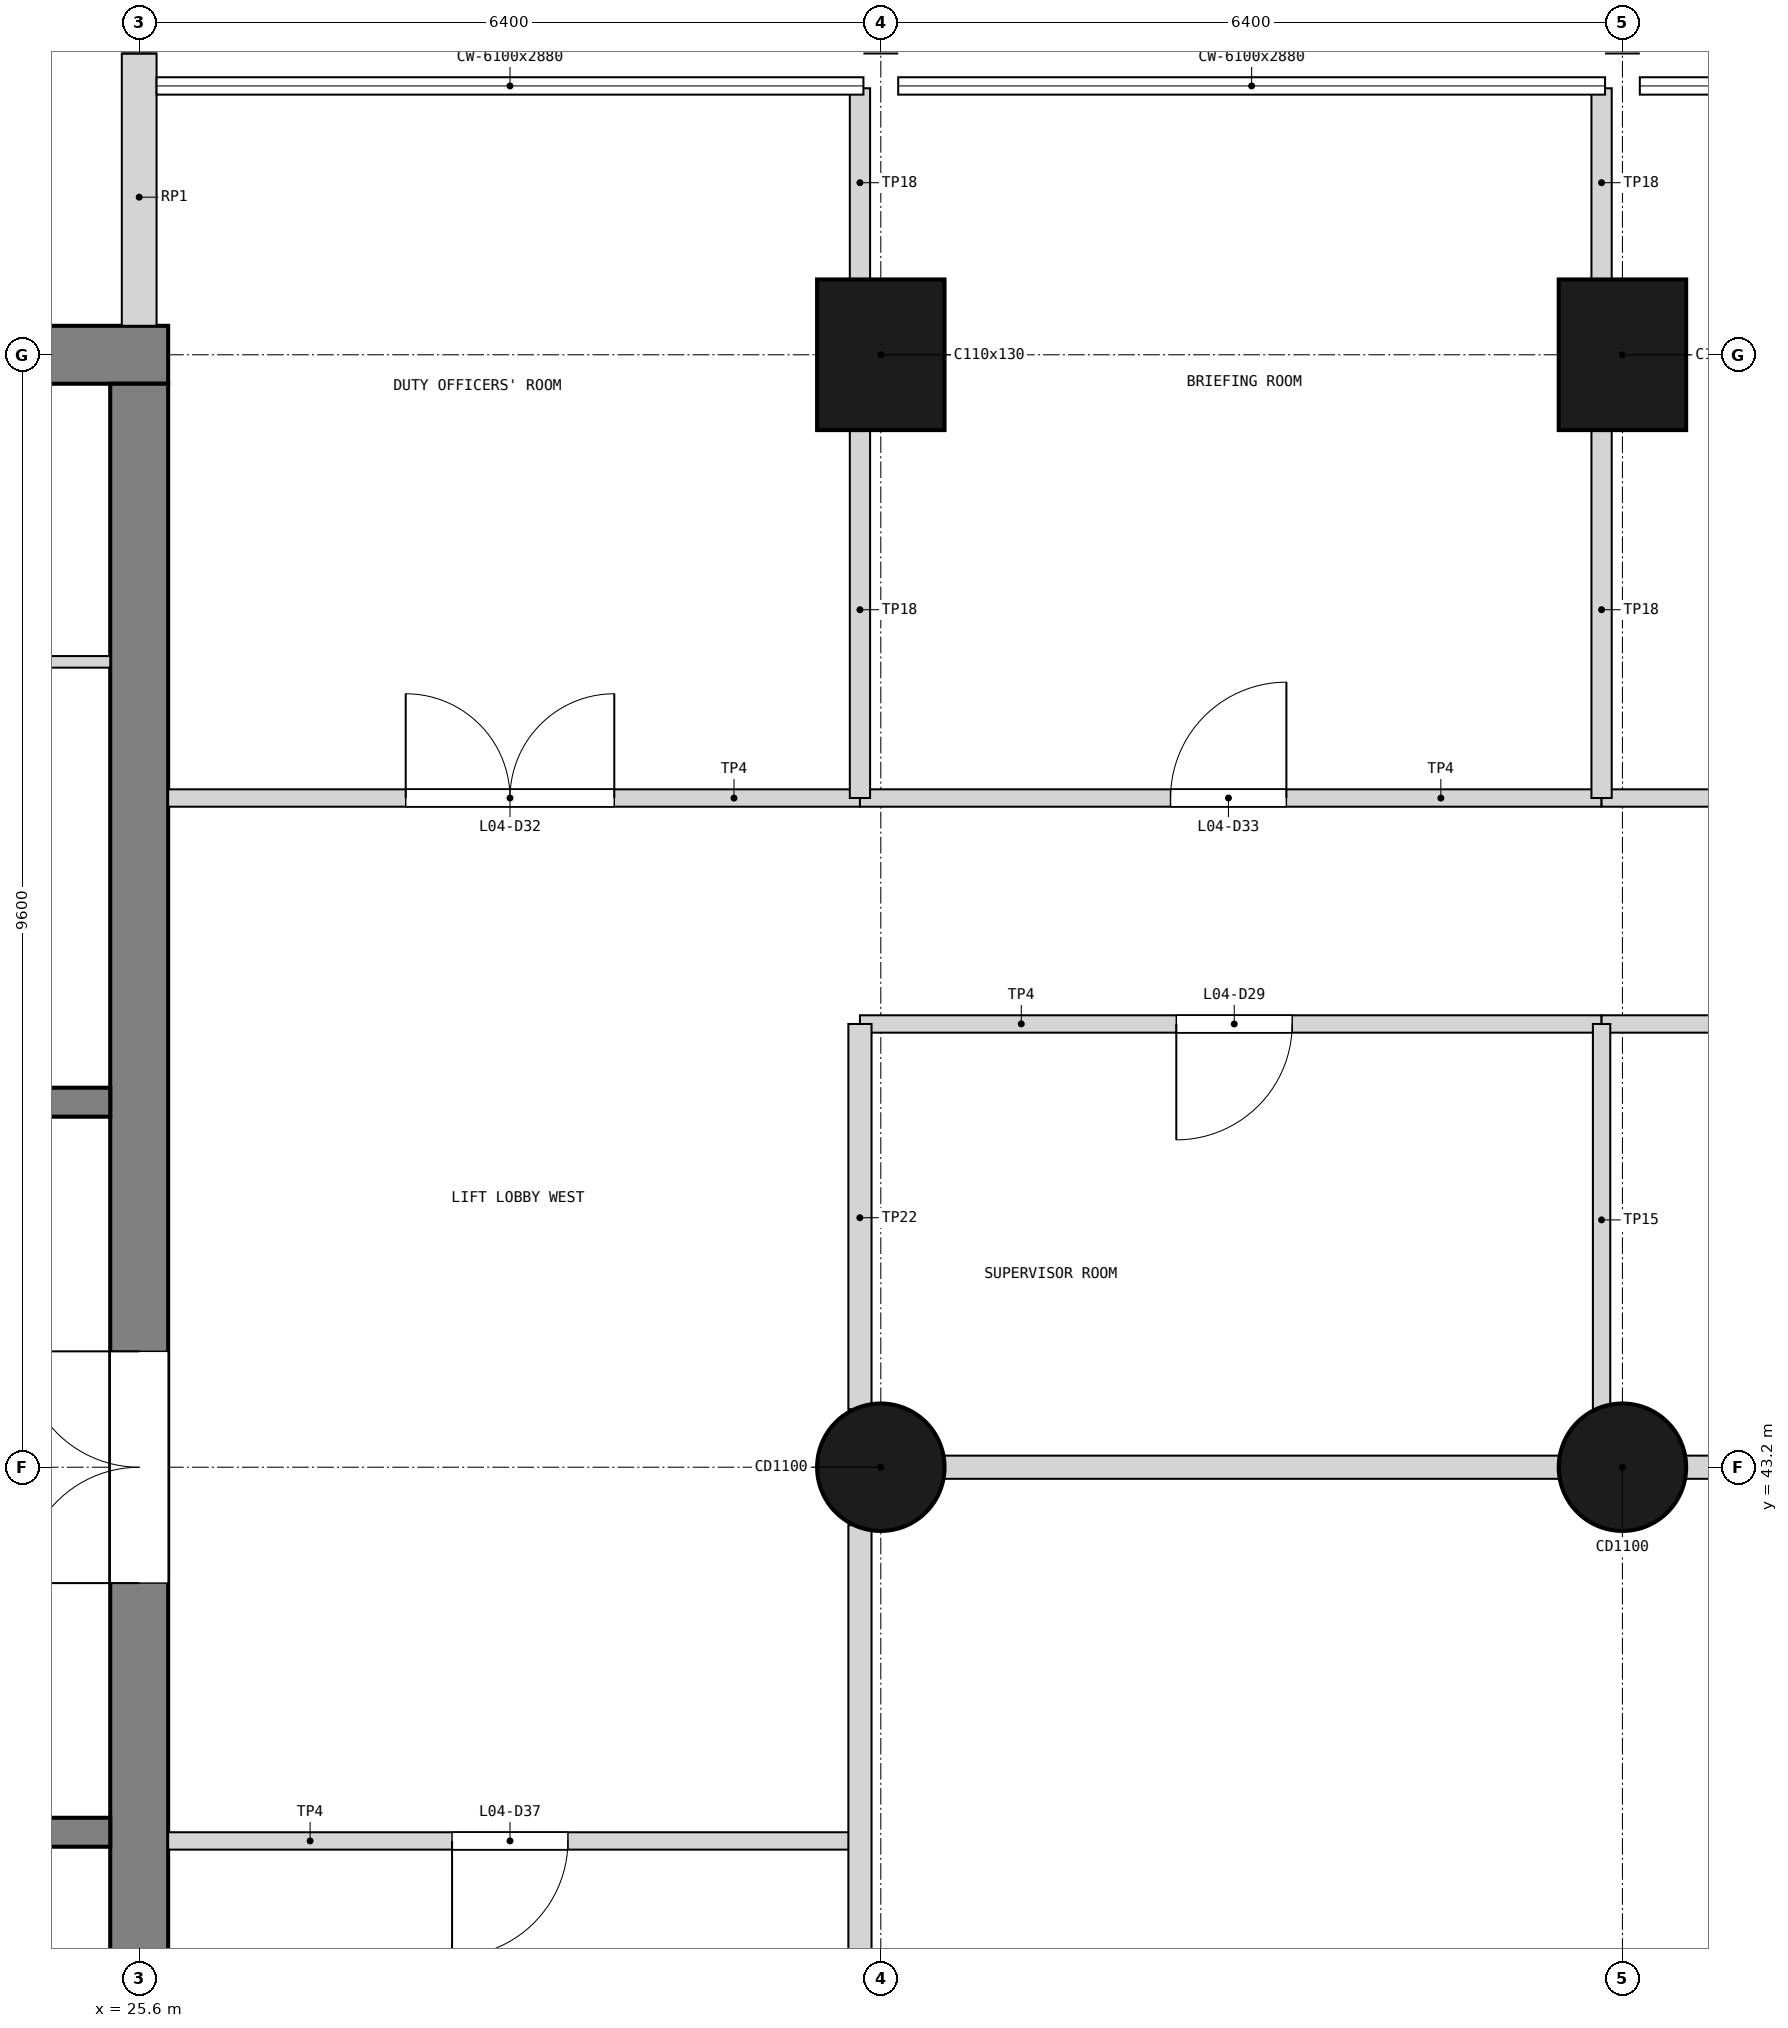
"""IFC4 building model, lengths in metres.
Left out: names, types, materials, properties, quantities, classifications, styles, units other than length and angle.
Written with IfcOpenShell. Run it as: python <this file> out.ifc"""

import sys

from ifc_helpers import new_model, si_unit, direction, frame, frame_2d, origin, origin_2d, place, context, subcontext, project, spatial, rectangle, circle, extrude, element, fill, save


model = new_model("IFC4")
c1 = context("Model", 3, precision=1e-05, world=origin(), true_north=direction((0.0, 1.0)))
c2 = subcontext(c1, "Body", "Model", "MODEL_VIEW")
j1 = project(units=[si_unit("LENGTHUNIT", "METRE"), si_unit("PLANEANGLEUNIT", "RADIAN")], contexts=[c1])
p1 = place(None, origin())
s1 = spatial("IfcSite", under=j1, at=p1, CompositionType="ELEMENT")
p2 = place(p1, origin())
s2 = spatial("IfcBuilding", under=s1, at=p2, CompositionType="ELEMENT")
p3 = place(p2, frame((0.0, 0.0, 17.1)))
s3 = spatial("IfcBuildingStorey", under=s2, at=p3, CompositionType="ELEMENT", Elevation=17.1)
p4 = place(p3, frame((12.55, 52.8, 0.0), z_axis=(0.0, 0.0, 1.0), x_axis=(1.0, 0.0, 0.0)))
e1 = element("IfcWall", 1, at=p4, inside=s3, PredefinedType="SHEAR", context=c2, shape_type="SweptSolid", body=[
    extrude(rectangle(XDim=13.3, YDim=0.5, at=frame_2d((6.65, 0.0))), origin(), (0.0, 0.0, 1.0), 3.9),
])
p5 = place(p4, frame((1.85, 0.0, 1.0)))
e2 = element("IfcOpeningElement", 2, at=p5, cuts=e1, PredefinedType="OPENING", context=c2, shape_type="SweptSolid", body=[
    extrude(rectangle(XDim=0.4, YDim=2.0, at=frame_2d((0.2, 1.0))), frame((0.0, 0.26, 0.0), z_axis=(0.0, -1.0, 0.0), x_axis=(1.0, 0.0, 0.0)), (0.0, 0.0, 1.0), 0.52),
])
p6 = place(p3, frame((25.6, 33.85, 0.0), z_axis=(0.0, 0.0, 1.0), x_axis=(0.0, 1.0, 0.0)))
e3 = element("IfcWall", 3, at=p6, inside=s3, PredefinedType="SHEAR", context=c2, shape_type="SweptSolid", body=[
    extrude(rectangle(XDim=18.7, YDim=0.5, at=frame_2d((9.35, 0.0))), origin(), (0.0, 0.0, 1.0), 3.9),
])
p7 = place(p6, frame((8.35, 0.0, 0.0)))
e4 = element("IfcOpeningElement", 4, at=p7, cuts=e3, PredefinedType="OPENING", context=c2, shape_type="SweptSolid", body=[
    extrude(rectangle(XDim=2.0, YDim=2.1, at=frame_2d((1.0, 1.05))), frame((0.0, 0.26, 0.0), z_axis=(0.0, -1.0, 0.0), x_axis=(1.0, 0.0, 0.0)), (0.0, 0.0, 1.0), 0.52),
])
p8 = place(p3, frame((32.0, 43.2, 0.0), z_axis=(0.0, 0.0, 1.0), x_axis=(1.0, 0.0, 0.0)))
e5 = element("IfcColumn", 5, at=p8, inside=s3, PredefinedType="COLUMN", context=c2, shape_type="SweptSolid", body=[
    extrude(circle(Radius=0.55, at=origin_2d()), origin(), (0.0, 0.0, 1.0), 3.9),
])
p9 = place(p3, frame((32.0, 52.8, 0.0), z_axis=(0.0, 0.0, 1.0), x_axis=(1.0, 0.0, 0.0)))
e6 = element("IfcColumn", 6, at=p9, inside=s3, PredefinedType="COLUMN", context=c2, shape_type="SweptSolid", body=[
    extrude(rectangle(XDim=1.1, YDim=1.3, at=origin_2d()), origin(), (0.0, 0.0, 1.0), 3.9),
])
p10 = place(p3, frame((38.4, 43.2, 0.0), z_axis=(0.0, 0.0, 1.0), x_axis=(1.0, 0.0, 0.0)))
e7 = element("IfcColumn", 7, at=p10, inside=s3, PredefinedType="COLUMN", context=c2, shape_type="SweptSolid", body=[
    extrude(circle(Radius=0.55, at=origin_2d()), origin(), (0.0, 0.0, 1.0), 3.9),
])
p11 = place(p3, frame((38.4, 52.8, 0.0), z_axis=(0.0, 0.0, 1.0), x_axis=(1.0, 0.0, 0.0)))
e8 = element("IfcColumn", 8, at=p11, inside=s3, PredefinedType="COLUMN", context=c2, shape_type="SweptSolid", body=[
    extrude(rectangle(XDim=1.1, YDim=1.3, at=origin_2d()), origin(), (0.0, 0.0, 1.0), 3.9),
])
p12 = place(p3, frame((25.6, 53.05, 0.0), z_axis=(0.0, 0.0, 1.0), x_axis=(0.0, 1.0, 0.0)))
e9 = element("IfcWall", 9, at=p12, inside=s3, PredefinedType="SOLIDWALL", context=c2, shape_type="SweptSolid", body=[
    extrude(rectangle(XDim=2.35, YDim=0.3, at=frame_2d((1.175, 0.0))), origin(), (0.0, 0.0, 1.0), 2.88),
])
for number, where, z_axis, x_axis in (
    (10, (19.875, 40.05, 0.0), (0.0, 0.0, 1.0), (1.0, 0.0, 0.0)),
    (11, (19.875, 46.35, 0.0), (0.0, 0.0, 1.0), (1.0, 0.0, 0.0)),
):
    element("IfcWall", number, at=place(p3, frame(where, z_axis=z_axis, x_axis=x_axis)), inside=s3, PredefinedType="SOLIDWALL", context=c2, shape_type="SweptSolid", body=[
        extrude(rectangle(XDim=5.475, YDim=0.25, at=frame_2d((2.738, 0.0))), origin(), (0.0, 0.0, 1.0), 3.6),
    ])
p13 = place(p3, frame((20.125, 50.15, 0.0), z_axis=(0.0, 0.0, 1.0), x_axis=(1.0, 0.0, 0.0)))
e12 = element("IfcWall", 12, at=p13, inside=s3, PredefinedType="PARTITIONING", context=c2, shape_type="SweptSolid", body=[
    extrude(rectangle(XDim=5.225, YDim=0.1, at=frame_2d((2.613, 0.0))), origin(), (0.0, 0.0, 1.0), 3.6),
])
p14 = place(p3, frame((31.82, 47.025, 0.0), z_axis=(0.0, 0.0, 1.0), x_axis=(1.0, 0.0, 0.0)))
e13 = element("IfcWall", 13, at=p14, inside=s3, PredefinedType="PARTITIONING", context=c2, shape_type="SweptSolid", body=[
    extrude(rectangle(XDim=6.4, YDim=0.15, at=frame_2d((3.2, 0.0))), origin(), (0.0, 0.0, 1.0), 3.68),
])
p15 = place(p14, frame((2.73, 0.0, 0.0)))
e14 = element("IfcOpeningElement", 14, at=p15, cuts=e13, PredefinedType="OPENING", context=c2, shape_type="SweptSolid", body=[
    extrude(rectangle(XDim=1.0, YDim=2.1, at=frame_2d((0.5, 1.05))), frame((0.0, 0.085, 0.0), z_axis=(0.0, -1.0, 0.0), x_axis=(1.0, 0.0, 0.0)), (0.0, 0.0, 1.0), 0.17),
])
p16 = place(p3, frame((38.22, 47.025, 0.0), z_axis=(0.0, 0.0, 1.0), x_axis=(1.0, 0.0, 0.0)))
e15 = element("IfcWall", 15, at=p16, inside=s3, PredefinedType="PARTITIONING", context=c2, shape_type="SweptSolid", body=[
    extrude(rectangle(XDim=19.56, YDim=0.15, at=frame_2d((9.78, 0.0))), origin(), (0.0, 0.0, 1.0), 3.68),
])
p17 = place(p16, frame((4.03, 0.0, 0.0)))
e16 = element("IfcOpeningElement", 16, at=p17, cuts=e15, PredefinedType="OPENING", context=c2, shape_type="SweptSolid", body=[
    extrude(rectangle(XDim=1.8, YDim=2.1, at=frame_2d((0.9, 1.05))), frame((0.0, 0.085, 0.0), z_axis=(0.0, -1.0, 0.0), x_axis=(1.0, 0.0, 0.0)), (0.0, 0.0, 1.0), 0.17),
])
p18 = place(p16, frame((13.68, 0.0, 0.0)))
e17 = element("IfcOpeningElement", 17, at=p18, cuts=e15, PredefinedType="OPENING", context=c2, shape_type="SweptSolid", body=[
    extrude(rectangle(XDim=1.8, YDim=2.1, at=frame_2d((0.9, 1.05))), frame((0.0, 0.085, 0.0), z_axis=(0.0, -1.0, 0.0), x_axis=(1.0, 0.0, 0.0)), (0.0, 0.0, 1.0), 0.17),
])
p19 = place(p3, frame((38.22, 43.7, 0.0), z_axis=(0.0, 0.0, 1.0), x_axis=(0.0, 1.0, 0.0)))
e18 = element("IfcWall", 18, at=p19, inside=s3, PredefinedType="PARTITIONING", context=c2, shape_type="SweptSolid", body=[
    extrude(rectangle(XDim=3.325, YDim=0.15, at=frame_2d((1.663, 0.0))), origin(), (0.0, 0.0, 1.0), 2.78),
])
p20 = place(p3, frame((25.85, 48.975, 0.0), z_axis=(0.0, 0.0, 1.0), x_axis=(1.0, 0.0, 0.0)))
e19 = element("IfcWall", 19, at=p20, inside=s3, PredefinedType="PARTITIONING", context=c2, shape_type="SweptSolid", body=[
    extrude(rectangle(XDim=5.97, YDim=0.15, at=frame_2d((2.985, 0.0))), origin(), (0.0, 0.0, 1.0), 3.68),
])
p21 = place(p20, frame((2.05, 0.0, 0.0)))
e20 = element("IfcOpeningElement", 20, at=p21, cuts=e19, PredefinedType="OPENING", context=c2, shape_type="SweptSolid", body=[
    extrude(rectangle(XDim=1.8, YDim=2.1, at=frame_2d((0.9, 1.05))), frame((0.0, 0.085, 0.0), z_axis=(0.0, -1.0, 0.0), x_axis=(1.0, 0.0, 0.0)), (0.0, 0.0, 1.0), 0.17),
])
p22 = place(p3, frame((31.82, 48.975, 0.0), z_axis=(0.0, 0.0, 1.0), x_axis=(1.0, 0.0, 0.0)))
e21 = element("IfcWall", 21, at=p22, inside=s3, PredefinedType="PARTITIONING", context=c2, shape_type="SweptSolid", body=[
    extrude(rectangle(XDim=6.4, YDim=0.15, at=frame_2d((3.2, 0.0))), origin(), (0.0, 0.0, 1.0), 3.68),
])
p23 = place(p22, frame((2.68, 0.0, 0.0)))
e22 = element("IfcOpeningElement", 22, at=p23, cuts=e21, PredefinedType="OPENING", context=c2, shape_type="SweptSolid", body=[
    extrude(rectangle(XDim=1.0, YDim=2.1, at=frame_2d((0.5, 1.05))), frame((0.0, 0.085, 0.0), z_axis=(0.0, -1.0, 0.0), x_axis=(1.0, 0.0, 0.0)), (0.0, 0.0, 1.0), 0.17),
])
p24 = place(p3, frame((38.22, 48.975, 0.0), z_axis=(0.0, 0.0, 1.0), x_axis=(1.0, 0.0, 0.0)))
e23 = element("IfcWall", 23, at=p24, inside=s3, PredefinedType="PARTITIONING", context=c2, shape_type="SweptSolid", body=[
    extrude(rectangle(XDim=9.78, YDim=0.15, at=frame_2d((4.89, 0.0))), origin(), (0.0, 0.0, 1.0), 3.68),
])
p25 = place(p24, frame((4.03, 0.0, 0.0)))
e24 = element("IfcOpeningElement", 24, at=p25, cuts=e23, PredefinedType="OPENING", context=c2, shape_type="SweptSolid", body=[
    extrude(rectangle(XDim=1.8, YDim=2.1, at=frame_2d((0.9, 1.05))), frame((0.0, 0.085, 0.0), z_axis=(0.0, -1.0, 0.0), x_axis=(1.0, 0.0, 0.0)), (0.0, 0.0, 1.0), 0.17),
])
p26 = place(p3, frame((31.82, 48.975, 0.0), z_axis=(0.0, 0.0, 1.0), x_axis=(0.0, 1.0, 0.0)))
e25 = element("IfcWall", 25, at=p26, inside=s3, PredefinedType="PARTITIONING", context=c2, shape_type="SweptSolid", body=[
    extrude(rectangle(XDim=3.195, YDim=0.175, at=frame_2d((1.597, 0.0))), origin(), (0.0, 0.0, 1.0), 2.78),
])
p27 = place(p3, frame((31.82, 53.43, 0.0), z_axis=(0.0, 0.0, 1.0), x_axis=(0.0, 1.0, 0.0)))
e26 = element("IfcWall", 26, at=p27, inside=s3, PredefinedType="PARTITIONING", context=c2, shape_type="SweptSolid", body=[
    extrude(rectangle(XDim=1.67, YDim=0.175, at=frame_2d((0.835, 0.0))), origin(), (0.0, 0.0, 1.0), 2.78),
])
p28 = place(p3, frame((38.22, 48.975, 0.0), z_axis=(0.0, 0.0, 1.0), x_axis=(0.0, 1.0, 0.0)))
e27 = element("IfcWall", 27, at=p28, inside=s3, PredefinedType="PARTITIONING", context=c2, shape_type="SweptSolid", body=[
    extrude(rectangle(XDim=3.195, YDim=0.175, at=frame_2d((1.597, 0.0))), origin(), (0.0, 0.0, 1.0), 2.78),
])
p29 = place(p3, frame((38.22, 53.43, 0.0), z_axis=(0.0, 0.0, 1.0), x_axis=(0.0, 1.0, 0.0)))
e28 = element("IfcWall", 28, at=p29, inside=s3, PredefinedType="PARTITIONING", context=c2, shape_type="SweptSolid", body=[
    extrude(rectangle(XDim=1.67, YDim=0.175, at=frame_2d((0.835, 0.0))), origin(), (0.0, 0.0, 1.0), 2.78),
])
p30 = place(p3, frame((31.82, 43.2, 0.0), z_axis=(0.0, 0.0, 1.0), x_axis=(1.0, 0.0, 0.0)))
e29 = element("IfcWall", 29, at=p30, inside=s3, PredefinedType="PARTITIONING", context=c2, shape_type="SweptSolid", body=[
    extrude(rectangle(XDim=25.96, YDim=0.2, at=frame_2d((12.98, 0.0))), origin(), (0.0, 0.0, 1.0), 2.88),
])
p31 = place(p30, frame((7.475, 0.0, 0.0)))
e30 = element("IfcOpeningElement", 30, at=p31, cuts=e29, PredefinedType="OPENING", context=c2, shape_type="SweptSolid", body=[
    extrude(rectangle(XDim=1.8, YDim=2.1, at=frame_2d((0.9, 1.05))), frame((0.0, 0.11, 0.0), z_axis=(0.0, -1.0, 0.0), x_axis=(1.0, 0.0, 0.0)), (0.0, 0.0, 1.0), 0.22),
])
p32 = place(p30, frame((10.225, 0.0, 0.0)))
e31 = element("IfcOpeningElement", 31, at=p32, cuts=e29, PredefinedType="OPENING", context=c2, shape_type="SweptSolid", body=[
    extrude(rectangle(XDim=1.8, YDim=2.1, at=frame_2d((0.9, 1.05))), frame((0.0, 0.11, 0.0), z_axis=(0.0, -1.0, 0.0), x_axis=(1.0, 0.0, 0.0)), (0.0, 0.0, 1.0), 0.22),
])
p33 = place(p30, frame((15.25, 0.0, 0.0)))
e32 = element("IfcOpeningElement", 32, at=p33, cuts=e29, PredefinedType="OPENING", context=c2, shape_type="SweptSolid", body=[
    extrude(rectangle(XDim=1.8, YDim=2.1, at=frame_2d((0.9, 1.05))), frame((0.0, 0.11, 0.0), z_axis=(0.0, -1.0, 0.0), x_axis=(1.0, 0.0, 0.0)), (0.0, 0.0, 1.0), 0.22),
])
p34 = place(p30, frame((21.7, 0.0, 0.0)))
e33 = element("IfcOpeningElement", 33, at=p34, cuts=e29, PredefinedType="OPENING", context=c2, shape_type="SweptSolid", body=[
    extrude(rectangle(XDim=1.8, YDim=2.1, at=frame_2d((0.9, 1.05))), frame((0.0, 0.11, 0.0), z_axis=(0.0, -1.0, 0.0), x_axis=(1.0, 0.0, 0.0)), (0.0, 0.0, 1.0), 0.22),
])
p35 = place(p3, frame((25.85, 39.975, 0.0), z_axis=(0.0, 0.0, 1.0), x_axis=(1.0, 0.0, 0.0)))
e34 = element("IfcWall", 34, at=p35, inside=s3, PredefinedType="PARTITIONING", context=c2, shape_type="SweptSolid", body=[
    extrude(rectangle(XDim=5.97, YDim=0.15, at=frame_2d((2.985, 0.0))), origin(), (0.0, 0.0, 1.0), 3.68),
])
p36 = place(p35, frame((2.45, 0.0, 0.0)))
e35 = element("IfcOpeningElement", 35, at=p36, cuts=e34, PredefinedType="OPENING", context=c2, shape_type="SweptSolid", body=[
    extrude(rectangle(XDim=1.0, YDim=2.1, at=frame_2d((0.5, 1.05))), frame((0.0, 0.085, 0.0), z_axis=(0.0, -1.0, 0.0), x_axis=(1.0, 0.0, 0.0)), (0.0, 0.0, 1.0), 0.17),
])
p37 = place(p3, frame((31.82, 34.23, 0.0), z_axis=(0.0, 0.0, 1.0), x_axis=(0.0, 1.0, 0.0)))
e36 = element("IfcWall", 36, at=p37, inside=s3, PredefinedType="PARTITIONING", context=c2, shape_type="SweptSolid", body=[
    extrude(rectangle(XDim=8.47, YDim=0.2, at=frame_2d((4.235, 0.0))), origin(), (0.0, 0.0, 1.0), 2.78),
])
p38 = place(p3, frame((31.82, 43.7, 0.0), z_axis=(0.0, 0.0, 1.0), x_axis=(0.0, 1.0, 0.0)))
e37 = element("IfcWall", 37, at=p38, inside=s3, PredefinedType="PARTITIONING", context=c2, shape_type="SweptSolid", body=[
    extrude(rectangle(XDim=3.325, YDim=0.2, at=frame_2d((1.663, 0.0))), origin(), (0.0, 0.0, 1.0), 2.78),
])
p39 = place(p7, origin())
e38 = element("IfcDoor", 38, at=p39, inside=s3, OperationType="DOUBLE_DOOR_SINGLE_SWING", PredefinedType="DOOR", context=c2, shape_type="SweptSolid", body=[
    extrude(rectangle(XDim=2.0, YDim=2.1, at=frame_2d((1.0, 1.05))), frame((0.0, 0.025, 0.0), z_axis=(0.0, -1.0, 0.0), x_axis=(1.0, 0.0, 0.0)), (0.0, 0.0, 1.0), 0.05),
])
fill(e4, e38)
p40 = place(p15, frame((1.0, 0.0, 0.0), z_axis=(0.0, 0.0, 1.0), x_axis=(-1.0, 0.0, 0.0)))
e39 = element("IfcDoor", 39, at=p40, inside=s3, OperationType="SINGLE_SWING_RIGHT", PredefinedType="DOOR", context=c2, shape_type="SweptSolid", body=[
    extrude(rectangle(XDim=1.0, YDim=2.1, at=frame_2d((0.5, 1.05))), frame((0.0, 0.025, 0.0), z_axis=(0.0, -1.0, 0.0), x_axis=(1.0, 0.0, 0.0)), (0.0, 0.0, 1.0), 0.05),
])
fill(e14, e39)
p41 = place(p21, origin())
e40 = element("IfcDoor", 40, at=p41, inside=s3, OperationType="DOUBLE_DOOR_SINGLE_SWING", PredefinedType="DOOR", context=c2, shape_type="SweptSolid", body=[
    extrude(rectangle(XDim=1.8, YDim=2.1, at=frame_2d((0.9, 1.05))), frame((0.0, 0.025, 0.0), z_axis=(0.0, -1.0, 0.0), x_axis=(1.0, 0.0, 0.0)), (0.0, 0.0, 1.0), 0.05),
])
fill(e20, e40)
p42 = place(p23, origin())
e41 = element("IfcDoor", 41, at=p42, inside=s3, OperationType="SINGLE_SWING_RIGHT", PredefinedType="DOOR", context=c2, shape_type="SweptSolid", body=[
    extrude(rectangle(XDim=1.0, YDim=2.1, at=frame_2d((0.5, 1.05))), frame((0.0, 0.025, 0.0), z_axis=(0.0, -1.0, 0.0), x_axis=(1.0, 0.0, 0.0)), (0.0, 0.0, 1.0), 0.05),
])
fill(e22, e41)
p43 = place(p36, frame((1.0, 0.0, 0.0), z_axis=(0.0, 0.0, 1.0), x_axis=(-1.0, 0.0, 0.0)))
e42 = element("IfcDoor", 42, at=p43, inside=s3, OperationType="SINGLE_SWING_RIGHT", PredefinedType="DOOR", context=c2, shape_type="SweptSolid", body=[
    extrude(rectangle(XDim=1.0, YDim=2.1, at=frame_2d((0.5, 1.05))), frame((0.0, 0.025, 0.0), z_axis=(0.0, -1.0, 0.0), x_axis=(1.0, 0.0, 0.0)), (0.0, 0.0, 1.0), 0.05),
])
fill(e35, e42)
save(model, sys.argv[1])
